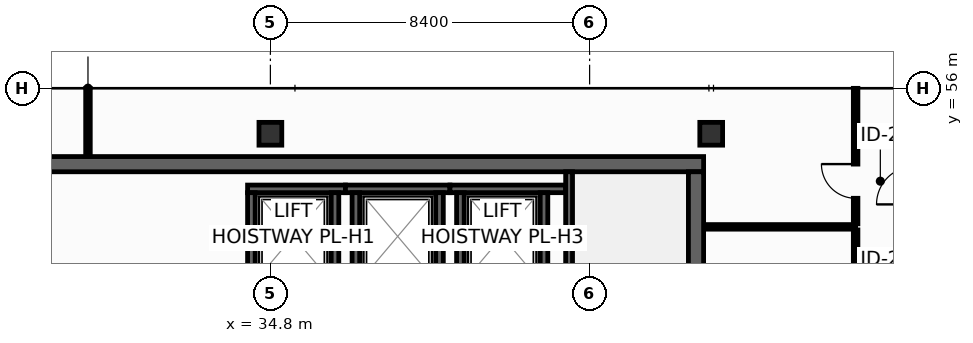
"""IFC4 building model, lengths in metres.
Left out: names, types, materials, properties, quantities, classifications, styles, units other than length and angle.
Written with IfcOpenShell. Run it as: python <this file> out.ifc"""

import sys

from ifc_helpers import new_model, si_unit, direction, frame, frame_2d, origin, origin_2d, place, context, subcontext, project, spatial, rectangle, hollow_rectangle, extrude, element, fill, save


model = new_model("IFC4")
c1 = context("Model", 3, precision=1e-05, world=origin(), true_north=direction((0.0, 1.0)))
c2 = subcontext(c1, "Body", "Model", "MODEL_VIEW")
j1 = project(units=[si_unit("LENGTHUNIT", "METRE"), si_unit("PLANEANGLEUNIT", "RADIAN")], contexts=[c1])
p1 = place(None, origin())
s1 = spatial("IfcSite", under=j1, at=p1, CompositionType="ELEMENT")
p2 = place(p1, origin())
s2 = spatial("IfcBuilding", under=s1, at=p2, CompositionType="ELEMENT")
p3 = place(p2, frame((0.0, 0.0, 264.8)))
s3 = spatial("IfcBuildingStorey", under=s2, at=p3, CompositionType="ELEMENT", Elevation=264.8)
p4 = place(p3, frame((13.7, 54.0, 0.0), z_axis=(0.0, 0.0, 1.0), x_axis=(1.0, 0.0, 0.0)))
e1 = element("IfcWall", 1, at=p4, inside=s3, PredefinedType="SHEAR", context=c2, shape_type="SweptSolid", body=[
    extrude(rectangle(XDim=32.5, YDim=0.4, at=frame_2d((16.25, 0.0))), origin(), (0.0, 0.0, 1.0), 3.55),
])
p5 = place(p3, frame((46.0, 43.4, 0.0), z_axis=(0.0, 0.0, 1.0), x_axis=(0.0, 1.0, 0.0)))
e2 = element("IfcWall", 2, at=p5, inside=s3, PredefinedType="SHEAR", context=c2, shape_type="SweptSolid", body=[
    extrude(rectangle(XDim=10.4, YDim=0.4, at=frame_2d((5.2, 0.0))), origin(), (0.0, 0.0, 1.0), 3.55),
])
for number, where, z_axis, x_axis in (
    (3, (34.8, 54.8, 0.0), (0.0, 0.0, 1.0), (1.0, 0.0, 0.0)),
    (4, (46.4, 54.8, 0.0), (0.0, 0.0, 1.0), (1.0, 0.0, 0.0)),
):
    element("IfcColumn", number, at=place(p3, frame(where, z_axis=z_axis, x_axis=x_axis)), inside=s3, PredefinedType="COLUMN", context=c2, shape_type="SweptSolid", body=[
        extrude(hollow_rectangle(XDim=0.6, YDim=0.6, WallThickness=0.028, at=origin_2d()), origin(), (0.0, 0.0, 1.0), 3.8),
    ])
p6 = place(p3, frame((34.2, 53.35, 0.0), z_axis=(0.0, 0.0, 1.0), x_axis=(1.0, 0.0, 0.0)))
e5 = element("IfcWall", 5, at=p6, inside=s3, PredefinedType="SHEAR", context=c2, shape_type="SweptSolid", body=[
    extrude(rectangle(XDim=2.575, YDim=0.2, at=frame_2d((1.288, 0.0))), origin(), (0.0, 0.0, 1.0), 3.55),
])
for number, where, z_axis, x_axis in (
    (6, (34.3, 50.95, 0.0), (0.0, 0.0, 1.0), (0.0, 1.0, 0.0)),
    (7, (36.5, 50.95, 0.0), (0.0, 0.0, 1.0), (0.0, 1.0, 0.0)),
):
    element("IfcWall", number, at=place(p3, frame(where, z_axis=z_axis, x_axis=x_axis)), inside=s3, PredefinedType="SHEAR", context=c2, shape_type="SweptSolid", body=[
        extrude(rectangle(XDim=2.3, YDim=0.2, at=frame_2d((1.15, 0.0))), origin(), (0.0, 0.0, 1.0), 3.55),
    ])
p7 = place(p3, frame((36.775, 53.35, 0.0), z_axis=(0.0, 0.0, 1.0), x_axis=(1.0, 0.0, 0.0)))
e8 = element("IfcWall", 8, at=p7, inside=s3, PredefinedType="SHEAR", context=c2, shape_type="SweptSolid", body=[
    extrude(rectangle(XDim=2.75, YDim=0.2, at=frame_2d((1.375, 0.0))), origin(), (0.0, 0.0, 1.0), 3.55),
])
for number, where, z_axis, x_axis in (
    (9, (37.05, 50.95, 0.0), (0.0, 0.0, 1.0), (0.0, 1.0, 0.0)),
    (10, (39.25, 50.95, 0.0), (0.0, 0.0, 1.0), (0.0, 1.0, 0.0)),
):
    element("IfcWall", number, at=place(p3, frame(where, z_axis=z_axis, x_axis=x_axis)), inside=s3, PredefinedType="SHEAR", context=c2, shape_type="SweptSolid", body=[
        extrude(rectangle(XDim=2.3, YDim=0.2, at=frame_2d((1.15, 0.0))), origin(), (0.0, 0.0, 1.0), 3.55),
    ])
p8 = place(p3, frame((39.525, 53.35, 0.0), z_axis=(0.0, 0.0, 1.0), x_axis=(1.0, 0.0, 0.0)))
e11 = element("IfcWall", 11, at=p8, inside=s3, PredefinedType="SHEAR", context=c2, shape_type="SweptSolid", body=[
    extrude(rectangle(XDim=3.045, YDim=0.2, at=frame_2d((1.522, 0.0))), origin(), (0.0, 0.0, 1.0), 3.55),
])
for number, where, z_axis, x_axis in (
    (12, (39.8, 50.95, 0.0), (0.0, 0.0, 1.0), (0.0, 1.0, 0.0)),
    (13, (42.0, 50.95, 0.0), (0.0, 0.0, 1.0), (0.0, 1.0, 0.0)),
):
    element("IfcWall", number, at=place(p3, frame(where, z_axis=z_axis, x_axis=x_axis)), inside=s3, PredefinedType="SHEAR", context=c2, shape_type="SweptSolid", body=[
        extrude(rectangle(XDim=2.3, YDim=0.2, at=frame_2d((1.15, 0.0))), origin(), (0.0, 0.0, 1.0), 3.55),
    ])
p9 = place(p3, frame((42.66, 53.8, 0.0), z_axis=(0.0, 0.0, 1.0), x_axis=(0.0, -1.0, 0.0)))
e14 = element("IfcWall", 14, at=p9, inside=s3, PredefinedType="SHEAR", context=c2, shape_type="SweptSolid", body=[
    extrude(rectangle(XDim=10.4, YDim=0.18, at=frame_2d((5.2, 0.0))), origin(), (0.0, 0.0, 1.0), 3.55),
])
p10 = place(p9, frame((8.99, 0.0, 0.0)))
e15 = element("IfcOpeningElement", 15, at=p10, cuts=e14, PredefinedType="OPENING", context=c2, shape_type="SweptSolid", body=[
    extrude(rectangle(XDim=1.1, YDim=2.15, at=frame_2d((0.55, 1.075))), frame((0.0, 0.1, 0.0), z_axis=(0.0, -1.0, 0.0), x_axis=(1.0, 0.0, 0.0)), (0.0, 0.0, 1.0), 0.2),
])
p11 = place(p3, frame((46.22, 52.35, 0.0), z_axis=(0.0, 0.0, 1.0), x_axis=(1.0, 0.0, 0.0)))
e16 = element("IfcWall", 16, at=p11, inside=s3, PredefinedType="PARTITIONING", context=c2, shape_type="SweptSolid", body=[
    extrude(rectangle(XDim=3.98, YDim=0.12, at=frame_2d((1.99, 0.0))), origin(), (0.0, 0.0, 1.0), 3.55),
])
p12 = place(p3, frame((30.0, 54.22, 0.0), z_axis=(0.0, 0.0, 1.0), x_axis=(0.0, 1.0, 0.0)))
e17 = element("IfcWall", 17, at=p12, inside=s3, PredefinedType="PARTITIONING", context=c2, shape_type="SweptSolid", body=[
    extrude(rectangle(XDim=1.775, YDim=0.12, at=frame_2d((0.888, 0.0))), origin(), (0.0, 0.0, 1.0), 2.935),
])
p13 = place(p3, frame((50.2, 48.29, 0.0), z_axis=(0.0, 0.0, 1.0), x_axis=(0.0, 1.0, 0.0)))
e18 = element("IfcWall", 18, at=p13, inside=s3, PredefinedType="PARTITIONING", context=c2, shape_type="SweptSolid", body=[
    extrude(rectangle(XDim=3.98, YDim=0.12, at=frame_2d((1.99, 0.0))), origin(), (0.0, 0.0, 1.0), 3.55),
])
p14 = place(p13, frame((1.54, 0.0, 0.0)))
e19 = element("IfcOpeningElement", 19, at=p14, cuts=e18, PredefinedType="OPENING", context=c2, shape_type="SweptSolid", body=[
    extrude(rectangle(XDim=0.9, YDim=2.1, at=frame_2d((0.45, 1.05))), frame((0.0, 0.07, 0.0), z_axis=(0.0, -1.0, 0.0), x_axis=(1.0, 0.0, 0.0)), (0.0, 0.0, 1.0), 0.14),
])
p15 = place(p3, frame((50.2, 52.43, 0.0), z_axis=(0.0, 0.0, 1.0), x_axis=(0.0, 1.0, 0.0)))
e20 = element("IfcWall", 20, at=p15, inside=s3, PredefinedType="PARTITIONING", context=c2, shape_type="SweptSolid", body=[
    extrude(rectangle(XDim=3.565, YDim=0.12, at=frame_2d((1.783, 0.0))), origin(), (0.0, 0.0, 1.0), 2.935),
])
p16 = place(p15, frame((0.672, 0.0, 0.0)))
e21 = element("IfcOpeningElement", 21, at=p16, cuts=e20, PredefinedType="OPENING", context=c2, shape_type="SweptSolid", body=[
    extrude(rectangle(XDim=0.9, YDim=2.1, at=frame_2d((0.45, 1.05))), frame((0.0, 0.07, 0.0), z_axis=(0.0, -1.0, 0.0), x_axis=(1.0, 0.0, 0.0)), (0.0, 0.0, 1.0), 0.14),
])
p17 = place(p16, origin())
e22 = element("IfcDoor", 22, at=p17, inside=s3, OperationType="SINGLE_SWING_RIGHT", PredefinedType="DOOR", context=c2, shape_type="SweptSolid", body=[
    extrude(rectangle(XDim=0.9, YDim=2.1, at=frame_2d((0.45, 1.05))), frame((0.0, 0.025, 0.0), z_axis=(0.0, -1.0, 0.0), x_axis=(1.0, 0.0, 0.0)), (0.0, 0.0, 1.0), 0.05),
])
fill(e21, e22)
save(model, sys.argv[1])
